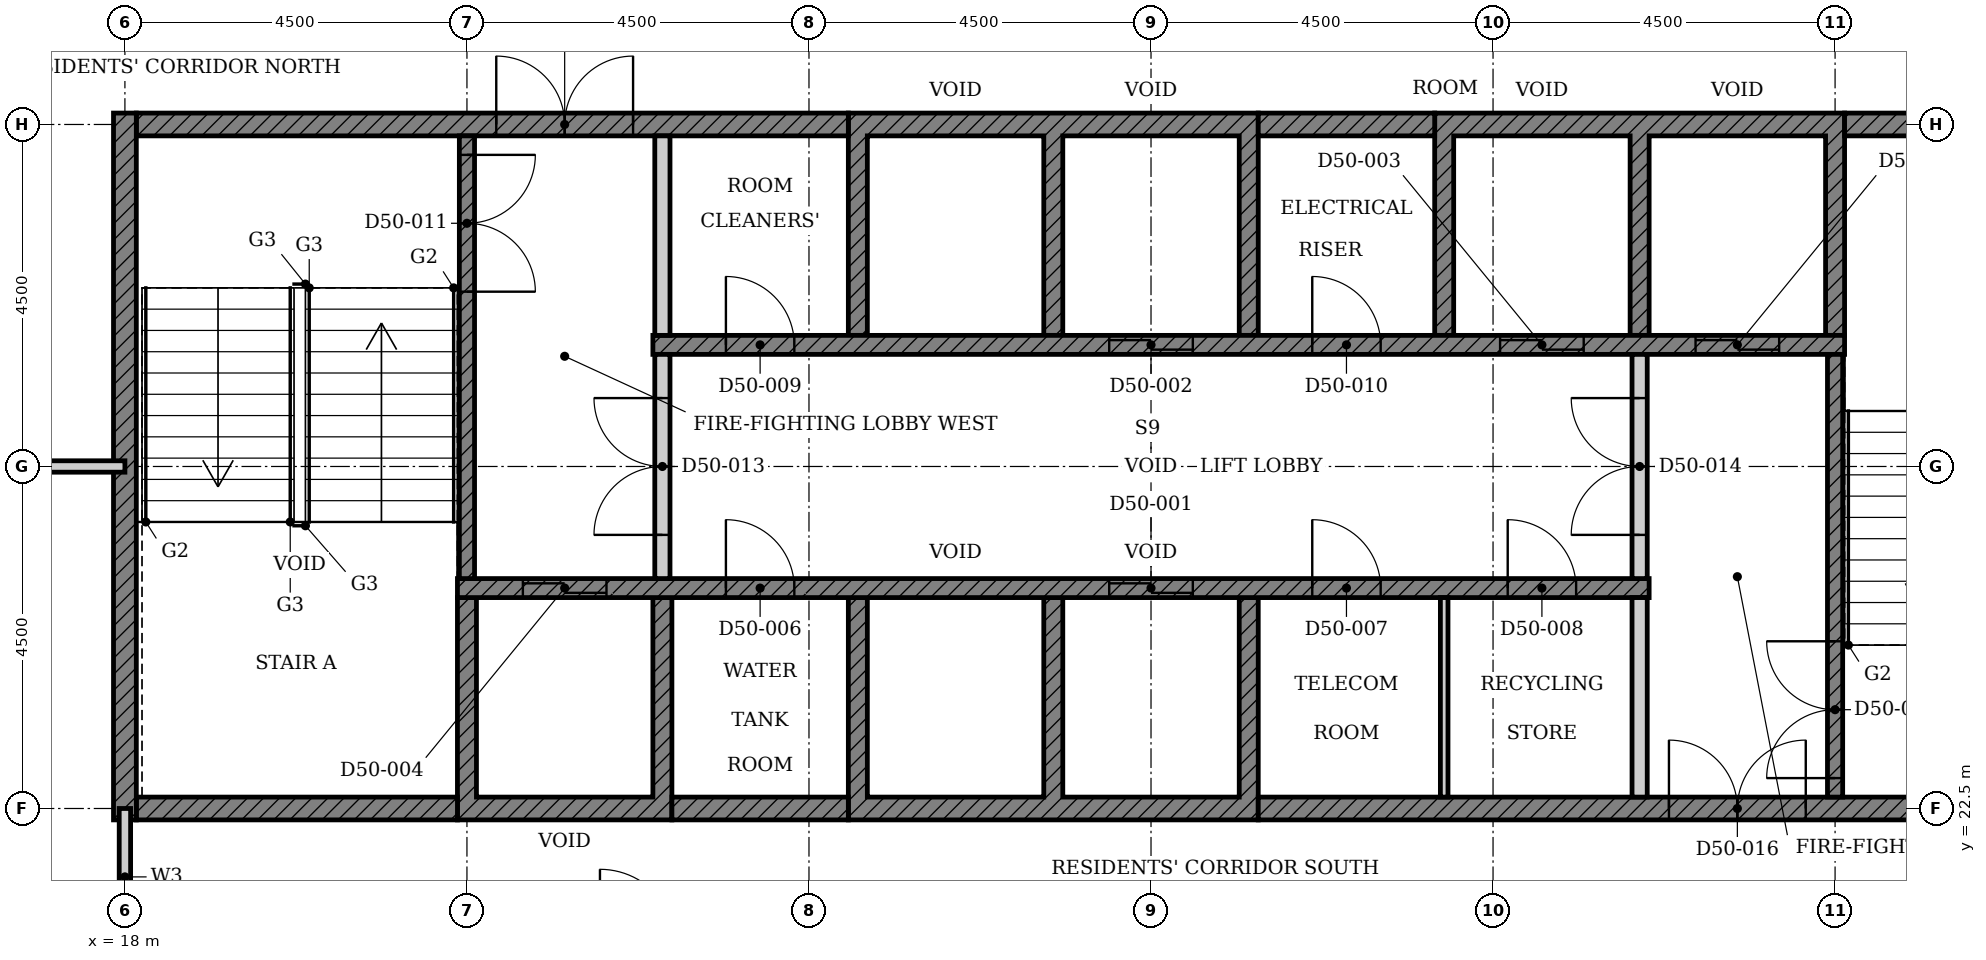
"""IFC4 building model, lengths in metres.
Left out: names, types, materials, properties, quantities, classifications, styles, units other than length and angle.
Written with IfcOpenShell. Run it as: python <this file> out.ifc"""

import sys

from ifc_helpers import new_model, si_unit, direction, frame, frame_2d, origin, place, context, subcontext, project, spatial, polyline, rectangle, outline, extrude, element, fill, save


model = new_model("IFC4")
c1 = context("Model", 3, precision=1e-05, world=origin(), true_north=direction((0.0, 1.0)))
c2 = subcontext(c1, "Body", "Model", "MODEL_VIEW")
j1 = project(units=[si_unit("LENGTHUNIT", "METRE"), si_unit("PLANEANGLEUNIT", "RADIAN")], contexts=[c1])
p1 = place(None, origin())
s1 = spatial("IfcSite", under=j1, at=p1, CompositionType="ELEMENT")
p2 = place(p1, origin())
s2 = spatial("IfcBuilding", under=s1, at=p2, CompositionType="ELEMENT")
p3 = place(p2, frame((0.0, 0.0, 199.8)))
s3 = spatial("IfcBuildingStorey", under=s2, at=p3, CompositionType="ELEMENT", Elevation=199.8)
p4 = place(p3, origin())
e1 = element("IfcWall", 1, at=p4, inside=s3, PredefinedType="SHEAR", context=c2, shape_type="SweptSolid", body=[
    extrude(outline(polyline([(22.375, 22.35), (25.197, 22.35), (25.197, 25.275), (24.947, 25.275), (24.947, 22.65), (22.625, 22.65), (22.625, 25.275), (22.375, 25.275), (22.375, 22.35)])), origin(), (0.0, 0.0, 1.0), 3.4),
])
p5 = place(p3, origin())
e2 = element("IfcWall", 2, at=p5, inside=s3, PredefinedType="SHEAR", context=c2, shape_type="SweptSolid", body=[
    extrude(outline(polyline([(27.518, 22.35), (32.911, 22.35), (32.911, 25.275), (32.661, 25.275), (32.661, 22.65), (30.339, 22.65), (30.339, 25.275), (30.089, 25.275), (30.089, 22.65), (27.768, 22.65), (27.768, 25.275), (27.518, 25.275), (27.518, 22.35)])), origin(), (0.0, 0.0, 1.0), 3.4),
])
p6 = place(p3, origin())
e3 = element("IfcWall", 3, at=p6, inside=s3, PredefinedType="SHEAR", context=c2, shape_type="SweptSolid", body=[
    extrude(outline(polyline([(27.518, 28.725), (27.768, 28.725), (27.768, 31.35), (30.089, 31.35), (30.089, 28.725), (30.339, 28.725), (30.339, 31.35), (32.661, 31.35), (32.661, 28.725), (32.911, 28.725), (32.911, 31.65), (27.518, 31.65), (27.518, 28.725)])), origin(), (0.0, 0.0, 1.0), 3.4),
])
p7 = place(p3, origin())
e4 = element("IfcWall", 4, at=p7, inside=s3, PredefinedType="SHEAR", context=c2, shape_type="SweptSolid", body=[
    extrude(outline(polyline([(35.232, 28.725), (35.482, 28.725), (35.482, 31.35), (37.803, 31.35), (37.803, 28.725), (38.053, 28.725), (38.053, 31.35), (40.375, 31.35), (40.375, 28.725), (40.625, 28.725), (40.625, 31.65), (35.232, 31.65), (35.232, 28.725)])), origin(), (0.0, 0.0, 1.0), 3.4),
])
p8 = place(p3, frame((18.15, 22.5, 0.0), z_axis=(0.0, 0.0, 1.0), x_axis=(1.0, 0.0, 0.0)))
e5 = element("IfcWall", 5, at=p8, inside=s3, PredefinedType="SHEAR", context=c2, shape_type="SweptSolid", body=[
    extrude(rectangle(XDim=4.225, YDim=0.3, at=frame_2d((2.113, 0.0))), origin(), (0.0, 0.0, 1.0), 3.4),
])
p9 = place(p3, frame((25.197, 22.5, 0.0), z_axis=(0.0, 0.0, 1.0), x_axis=(1.0, 0.0, 0.0)))
e6 = element("IfcWall", 6, at=p9, inside=s3, PredefinedType="SHEAR", context=c2, shape_type="SweptSolid", body=[
    extrude(rectangle(XDim=2.321, YDim=0.3, at=frame_2d((1.161, 0.0))), origin(), (0.0, 0.0, 1.0), 3.4),
])
p10 = place(p3, frame((32.911, 22.5, 0.0), z_axis=(0.0, 0.0, 1.0), x_axis=(1.0, 0.0, 0.0)))
e7 = element("IfcWall", 7, at=p10, inside=s3, PredefinedType="SHEAR", context=c2, shape_type="SweptSolid", body=[
    extrude(rectangle(XDim=11.939, YDim=0.3, at=frame_2d((5.97, 0.0))), origin(), (0.0, 0.0, 1.0), 3.4),
])
p11 = place(p10, frame((5.404, 0.0, 0.0)))
e8 = element("IfcOpeningElement", 8, at=p11, cuts=e7, PredefinedType="OPENING", context=c2, shape_type="SweptSolid", body=[
    extrude(rectangle(XDim=1.8, YDim=2.1, at=frame_2d((0.9, 1.05))), frame((0.0, 0.16, 0.0), z_axis=(0.0, -1.0, 0.0), x_axis=(1.0, 0.0, 0.0)), (0.0, 0.0, 1.0), 0.32),
])
p12 = place(p3, frame((18.15, 31.5, 0.0), z_axis=(0.0, 0.0, 1.0), x_axis=(1.0, 0.0, 0.0)))
e9 = element("IfcWall", 9, at=p12, inside=s3, PredefinedType="SHEAR", context=c2, shape_type="SweptSolid", body=[
    extrude(rectangle(XDim=9.368, YDim=0.3, at=frame_2d((4.684, 0.0))), origin(), (0.0, 0.0, 1.0), 3.4),
])
p13 = place(p12, frame((4.736, 0.0, 0.0)))
e10 = element("IfcOpeningElement", 10, at=p13, cuts=e9, PredefinedType="OPENING", context=c2, shape_type="SweptSolid", body=[
    extrude(rectangle(XDim=1.8, YDim=2.1, at=frame_2d((0.9, 1.05))), frame((0.0, 0.16, 0.0), z_axis=(0.0, -1.0, 0.0), x_axis=(1.0, 0.0, 0.0)), (0.0, 0.0, 1.0), 0.32),
])
p14 = place(p3, frame((32.911, 31.5, 0.0), z_axis=(0.0, 0.0, 1.0), x_axis=(1.0, 0.0, 0.0)))
e11 = element("IfcWall", 11, at=p14, inside=s3, PredefinedType="SHEAR", context=c2, shape_type="SweptSolid", body=[
    extrude(rectangle(XDim=2.322, YDim=0.3, at=frame_2d((1.161, 0.0))), origin(), (0.0, 0.0, 1.0), 3.4),
])
p15 = place(p3, frame((40.625, 31.5, 0.0), z_axis=(0.0, 0.0, 1.0), x_axis=(1.0, 0.0, 0.0)))
e12 = element("IfcWall", 12, at=p15, inside=s3, PredefinedType="SHEAR", context=c2, shape_type="SweptSolid", body=[
    extrude(rectangle(XDim=4.225, YDim=0.3, at=frame_2d((2.113, 0.0))), origin(), (0.0, 0.0, 1.0), 3.4),
])
p16 = place(p3, frame((18.0, 22.35, 0.0), z_axis=(0.0, 0.0, 1.0), x_axis=(0.0, 1.0, 0.0)))
e13 = element("IfcWall", 13, at=p16, inside=s3, PredefinedType="SHEAR", context=c2, shape_type="SweptSolid", body=[
    extrude(rectangle(XDim=9.3, YDim=0.3, at=frame_2d((4.65, 0.0))), origin(), (0.0, 0.0, 1.0), 3.4),
])
p17 = place(p3, frame((22.375, 25.4, 0.0), z_axis=(0.0, 0.0, 1.0), x_axis=(1.0, 0.0, 0.0)))
e14 = element("IfcWall", 14, at=p17, inside=s3, PredefinedType="SHEAR", context=c2, shape_type="SweptSolid", body=[
    extrude(rectangle(XDim=15.678, YDim=0.25, at=frame_2d((7.839, 0.0))), origin(), (0.0, 0.0, 1.0), 3.4),
])
p18 = place(p17, frame((8.575, 0.0, 0.0)))
e15 = element("IfcOpeningElement", 15, at=p18, cuts=e14, PredefinedType="OPENING", context=c2, shape_type="SweptSolid", body=[
    extrude(rectangle(XDim=1.1, YDim=2.1, at=frame_2d((0.55, 1.05))), frame((0.0, 0.135, 0.0), z_axis=(0.0, -1.0, 0.0), x_axis=(1.0, 0.0, 0.0)), (0.0, 0.0, 1.0), 0.27),
])
p19 = place(p17, frame((0.861, 0.0, 0.0)))
e16 = element("IfcOpeningElement", 16, at=p19, cuts=e14, PredefinedType="OPENING", context=c2, shape_type="SweptSolid", body=[
    extrude(rectangle(XDim=1.1, YDim=2.1, at=frame_2d((0.55, 1.05))), frame((0.0, 0.135, 0.0), z_axis=(0.0, -1.0, 0.0), x_axis=(1.0, 0.0, 0.0)), (0.0, 0.0, 1.0), 0.27),
])
p20 = place(p17, frame((3.532, 0.0, 0.0)))
e17 = element("IfcOpeningElement", 17, at=p20, cuts=e14, PredefinedType="OPENING", context=c2, shape_type="SweptSolid", body=[
    extrude(rectangle(XDim=0.9, YDim=2.1, at=frame_2d((0.45, 1.05))), frame((0.0, 0.135, 0.0), z_axis=(0.0, -1.0, 0.0), x_axis=(1.0, 0.0, 0.0)), (0.0, 0.0, 1.0), 0.27),
])
p21 = place(p17, frame((11.246, 0.0, 0.0)))
e18 = element("IfcOpeningElement", 18, at=p21, cuts=e14, PredefinedType="OPENING", context=c2, shape_type="SweptSolid", body=[
    extrude(rectangle(XDim=0.9, YDim=2.1, at=frame_2d((0.45, 1.05))), frame((0.0, 0.135, 0.0), z_axis=(0.0, -1.0, 0.0), x_axis=(1.0, 0.0, 0.0)), (0.0, 0.0, 1.0), 0.27),
])
p22 = place(p17, frame((13.818, 0.0, 0.0)))
e19 = element("IfcOpeningElement", 19, at=p22, cuts=e14, PredefinedType="OPENING", context=c2, shape_type="SweptSolid", body=[
    extrude(rectangle(XDim=0.9, YDim=2.1, at=frame_2d((0.45, 1.05))), frame((0.0, 0.135, 0.0), z_axis=(0.0, -1.0, 0.0), x_axis=(1.0, 0.0, 0.0)), (0.0, 0.0, 1.0), 0.27),
])
p23 = place(p3, frame((24.947, 28.6, 0.0), z_axis=(0.0, 0.0, 1.0), x_axis=(1.0, 0.0, 0.0)))
e20 = element("IfcWall", 20, at=p23, inside=s3, PredefinedType="SHEAR", context=c2, shape_type="SweptSolid", body=[
    extrude(rectangle(XDim=15.678, YDim=0.25, at=frame_2d((7.839, 0.0))), origin(), (0.0, 0.0, 1.0), 3.4),
])
p24 = place(p23, frame((6.004, 0.0, 0.0)))
e21 = element("IfcOpeningElement", 21, at=p24, cuts=e20, PredefinedType="OPENING", context=c2, shape_type="SweptSolid", body=[
    extrude(rectangle(XDim=1.1, YDim=2.1, at=frame_2d((0.55, 1.05))), frame((0.0, 0.135, 0.0), z_axis=(0.0, -1.0, 0.0), x_axis=(1.0, 0.0, 0.0)), (0.0, 0.0, 1.0), 0.27),
])
p25 = place(p23, frame((11.146, 0.0, 0.0)))
e22 = element("IfcOpeningElement", 22, at=p25, cuts=e20, PredefinedType="OPENING", context=c2, shape_type="SweptSolid", body=[
    extrude(rectangle(XDim=1.1, YDim=2.1, at=frame_2d((0.55, 1.05))), frame((0.0, 0.135, 0.0), z_axis=(0.0, -1.0, 0.0), x_axis=(1.0, 0.0, 0.0)), (0.0, 0.0, 1.0), 0.27),
])
p26 = place(p23, frame((13.718, 0.0, 0.0)))
e23 = element("IfcOpeningElement", 23, at=p26, cuts=e20, PredefinedType="OPENING", context=c2, shape_type="SweptSolid", body=[
    extrude(rectangle(XDim=1.1, YDim=2.1, at=frame_2d((0.55, 1.05))), frame((0.0, 0.135, 0.0), z_axis=(0.0, -1.0, 0.0), x_axis=(1.0, 0.0, 0.0)), (0.0, 0.0, 1.0), 0.27),
])
p27 = place(p23, frame((0.961, 0.0, 0.0)))
e24 = element("IfcOpeningElement", 24, at=p27, cuts=e20, PredefinedType="OPENING", context=c2, shape_type="SweptSolid", body=[
    extrude(rectangle(XDim=0.9, YDim=2.1, at=frame_2d((0.45, 1.05))), frame((0.0, 0.135, 0.0), z_axis=(0.0, -1.0, 0.0), x_axis=(1.0, 0.0, 0.0)), (0.0, 0.0, 1.0), 0.27),
])
p28 = place(p23, frame((8.675, 0.0, 0.0)))
e25 = element("IfcOpeningElement", 25, at=p28, cuts=e20, PredefinedType="OPENING", context=c2, shape_type="SweptSolid", body=[
    extrude(rectangle(XDim=0.9, YDim=2.1, at=frame_2d((0.45, 1.05))), frame((0.0, 0.135, 0.0), z_axis=(0.0, -1.0, 0.0), x_axis=(1.0, 0.0, 0.0)), (0.0, 0.0, 1.0), 0.27),
])
p29 = place(p3, frame((37.928, 22.65, 0.0), z_axis=(0.0, 0.0, 1.0), x_axis=(0.0, 1.0, 0.0)))
e26 = element("IfcWall", 26, at=p29, inside=s3, PredefinedType="PARTITIONING", context=c2, shape_type="SweptSolid", body=[
    extrude(rectangle(XDim=2.625, YDim=0.2, at=frame_2d((1.312, 0.0))), origin(), (0.0, 0.0, 1.0), 3.4),
])
p30 = place(p3, frame((35.357, 22.65, 0.0), z_axis=(0.0, 0.0, 1.0), x_axis=(0.0, 1.0, 0.0)))
e27 = element("IfcWall", 27, at=p30, inside=s3, PredefinedType="PARTITIONING", context=c2, shape_type="SweptSolid", body=[
    extrude(rectangle(XDim=2.625, YDim=0.1, at=frame_2d((1.312, 0.0))), origin(), (0.0, 0.0, 1.0), 3.4),
])
p31 = place(p3, frame((25.072, 28.725, 0.0), z_axis=(0.0, 0.0, 1.0), x_axis=(0.0, 1.0, 0.0)))
e28 = element("IfcWall", 28, at=p31, inside=s3, PredefinedType="PARTITIONING", context=c2, shape_type="SweptSolid", body=[
    extrude(rectangle(XDim=2.625, YDim=0.2, at=frame_2d((1.312, 0.0))), origin(), (0.0, 0.0, 1.0), 3.4),
])
p32 = place(p3, frame((22.5, 31.35, 0.0), z_axis=(0.0, 0.0, 1.0), x_axis=(0.0, -1.0, 0.0)))
e29 = element("IfcWall", 29, at=p32, inside=s3, PredefinedType="SHEAR", context=c2, shape_type="SweptSolid", body=[
    extrude(rectangle(XDim=5.825, YDim=0.2, at=frame_2d((2.913, 0.0))), origin(), (0.0, 0.0, 1.0), 3.4),
])
p33 = place(p32, frame((0.25, 0.0, 0.0)))
e30 = element("IfcOpeningElement", 30, at=p33, cuts=e29, PredefinedType="OPENING", context=c2, shape_type="SweptSolid", body=[
    extrude(rectangle(XDim=1.8, YDim=2.1, at=frame_2d((0.9, 1.05))), frame((0.0, 0.11, 0.0), z_axis=(0.0, -1.0, 0.0), x_axis=(1.0, 0.0, 0.0)), (0.0, 0.0, 1.0), 0.22),
])
p34 = place(p3, frame((40.5, 22.65, 0.0), z_axis=(0.0, 0.0, 1.0), x_axis=(0.0, 1.0, 0.0)))
e31 = element("IfcWall", 31, at=p34, inside=s3, PredefinedType="SHEAR", context=c2, shape_type="SweptSolid", body=[
    extrude(rectangle(XDim=5.825, YDim=0.2, at=frame_2d((2.913, 0.0))), origin(), (0.0, 0.0, 1.0), 3.4),
])
p35 = place(p34, frame((0.25, 0.0, 0.0)))
e32 = element("IfcOpeningElement", 32, at=p35, cuts=e31, PredefinedType="OPENING", context=c2, shape_type="SweptSolid", body=[
    extrude(rectangle(XDim=1.8, YDim=2.1, at=frame_2d((0.9, 1.05))), frame((0.0, 0.11, 0.0), z_axis=(0.0, -1.0, 0.0), x_axis=(1.0, 0.0, 0.0)), (0.0, 0.0, 1.0), 0.22),
])
p36 = place(p3, frame((25.072, 25.525, 0.0), z_axis=(0.0, 0.0, 1.0), x_axis=(0.0, 1.0, 0.0)))
e33 = element("IfcWall", 33, at=p36, inside=s3, PredefinedType="PARTITIONING", context=c2, shape_type="SweptSolid", body=[
    extrude(rectangle(XDim=2.95, YDim=0.2, at=frame_2d((1.475, 0.0))), origin(), (0.0, 0.0, 1.0), 3.4),
])
p37 = place(p36, frame((0.575, 0.0, 0.0)))
e34 = element("IfcOpeningElement", 34, at=p37, cuts=e33, PredefinedType="OPENING", context=c2, shape_type="SweptSolid", body=[
    extrude(rectangle(XDim=1.8, YDim=2.1, at=frame_2d((0.9, 1.05))), frame((0.0, 0.11, 0.0), z_axis=(0.0, -1.0, 0.0), x_axis=(1.0, 0.0, 0.0)), (0.0, 0.0, 1.0), 0.22),
])
p38 = place(p3, frame((37.928, 25.525, 0.0), z_axis=(0.0, 0.0, 1.0), x_axis=(0.0, 1.0, 0.0)))
e35 = element("IfcWall", 35, at=p38, inside=s3, PredefinedType="PARTITIONING", context=c2, shape_type="SweptSolid", body=[
    extrude(rectangle(XDim=2.95, YDim=0.2, at=frame_2d((1.475, 0.0))), origin(), (0.0, 0.0, 1.0), 3.4),
])
p39 = place(p38, frame((0.575, 0.0, 0.0)))
e36 = element("IfcOpeningElement", 36, at=p39, cuts=e35, PredefinedType="OPENING", context=c2, shape_type="SweptSolid", body=[
    extrude(rectangle(XDim=1.8, YDim=2.1, at=frame_2d((0.9, 1.05))), frame((0.0, 0.11, 0.0), z_axis=(0.0, -1.0, 0.0), x_axis=(1.0, 0.0, 0.0)), (0.0, 0.0, 1.0), 0.22),
])
p40 = place(p3, frame((4.5, 27.0, 0.0), z_axis=(0.0, 0.0, 1.0), x_axis=(1.0, 0.0, 0.0)))
e37 = element("IfcWall", 37, at=p40, inside=s3, PredefinedType="PARTITIONING", context=c2, shape_type="SweptSolid", body=[
    extrude(rectangle(XDim=13.5, YDim=0.15, at=frame_2d((6.75, 0.0))), origin(), (0.0, 0.0, 1.0), 2.68),
])
p41 = place(p40, frame((5.35, 0.0, 0.0)))
e38 = element("IfcOpeningElement", 38, at=p41, cuts=e37, PredefinedType="OPENING", context=c2, shape_type="SweptSolid", body=[
    extrude(rectangle(XDim=1.0, YDim=2.1, at=frame_2d((0.5, 1.05))), frame((0.0, 0.085, 0.0), z_axis=(0.0, -1.0, 0.0), x_axis=(1.0, 0.0, 0.0)), (0.0, 0.0, 1.0), 0.17),
])
p42 = place(p3, frame((18.0, 20.7, 0.0), z_axis=(0.0, 0.0, 1.0), x_axis=(0.0, 1.0, 0.0)))
e39 = element("IfcWall", 39, at=p42, inside=s3, PredefinedType="PARTITIONING", context=c2, shape_type="SweptSolid", body=[
    extrude(rectangle(XDim=1.8, YDim=0.15, at=frame_2d((0.9, 0.0))), origin(), (0.0, 0.0, 1.0), 3.4),
])
p43 = place(p18, origin())
e40 = element("IfcDoor", 40, at=p43, inside=s3, OperationType="DOUBLE_DOOR_SLIDING", PredefinedType="DOOR", context=c2, shape_type="SweptSolid", body=[
    extrude(rectangle(XDim=1.1, YDim=2.1, at=frame_2d((0.55, 1.05))), frame((0.0, 0.025, 0.0), z_axis=(0.0, -1.0, 0.0), x_axis=(1.0, 0.0, 0.0)), (0.0, 0.0, 1.0), 0.05),
])
fill(e15, e40)
p44 = place(p24, origin())
e41 = element("IfcDoor", 41, at=p44, inside=s3, OperationType="DOUBLE_DOOR_SLIDING", PredefinedType="DOOR", context=c2, shape_type="SweptSolid", body=[
    extrude(rectangle(XDim=1.1, YDim=2.1, at=frame_2d((0.55, 1.05))), frame((0.0, 0.025, 0.0), z_axis=(0.0, -1.0, 0.0), x_axis=(1.0, 0.0, 0.0)), (0.0, 0.0, 1.0), 0.05),
])
fill(e21, e41)
p45 = place(p25, origin())
e42 = element("IfcDoor", 42, at=p45, inside=s3, OperationType="DOUBLE_DOOR_SLIDING", PredefinedType="DOOR", context=c2, shape_type="SweptSolid", body=[
    extrude(rectangle(XDim=1.1, YDim=2.1, at=frame_2d((0.55, 1.05))), frame((0.0, 0.025, 0.0), z_axis=(0.0, -1.0, 0.0), x_axis=(1.0, 0.0, 0.0)), (0.0, 0.0, 1.0), 0.05),
])
fill(e22, e42)
p46 = place(p19, origin())
e43 = element("IfcDoor", 43, at=p46, inside=s3, OperationType="DOUBLE_DOOR_SLIDING", PredefinedType="DOOR", context=c2, shape_type="SweptSolid", body=[
    extrude(rectangle(XDim=1.1, YDim=2.1, at=frame_2d((0.55, 1.05))), frame((0.0, 0.025, 0.0), z_axis=(0.0, -1.0, 0.0), x_axis=(1.0, 0.0, 0.0)), (0.0, 0.0, 1.0), 0.05),
])
fill(e16, e43)
p47 = place(p26, origin())
e44 = element("IfcDoor", 44, at=p47, inside=s3, OperationType="DOUBLE_DOOR_SLIDING", PredefinedType="DOOR", context=c2, shape_type="SweptSolid", body=[
    extrude(rectangle(XDim=1.1, YDim=2.1, at=frame_2d((0.55, 1.05))), frame((0.0, 0.025, 0.0), z_axis=(0.0, -1.0, 0.0), x_axis=(1.0, 0.0, 0.0)), (0.0, 0.0, 1.0), 0.05),
])
fill(e23, e44)
p48 = place(p20, origin())
e45 = element("IfcDoor", 45, at=p48, inside=s3, OperationType="SINGLE_SWING_LEFT", PredefinedType="DOOR", context=c2, shape_type="SweptSolid", body=[
    extrude(rectangle(XDim=0.9, YDim=2.1, at=frame_2d((0.45, 1.05))), frame((0.0, 0.025, 0.0), z_axis=(0.0, -1.0, 0.0), x_axis=(1.0, 0.0, 0.0)), (0.0, 0.0, 1.0), 0.05),
])
fill(e17, e45)
p49 = place(p21, origin())
e46 = element("IfcDoor", 46, at=p49, inside=s3, OperationType="SINGLE_SWING_LEFT", PredefinedType="DOOR", context=c2, shape_type="SweptSolid", body=[
    extrude(rectangle(XDim=0.9, YDim=2.1, at=frame_2d((0.45, 1.05))), frame((0.0, 0.025, 0.0), z_axis=(0.0, -1.0, 0.0), x_axis=(1.0, 0.0, 0.0)), (0.0, 0.0, 1.0), 0.05),
])
fill(e18, e46)
p50 = place(p22, origin())
e47 = element("IfcDoor", 47, at=p50, inside=s3, OperationType="SINGLE_SWING_LEFT", PredefinedType="DOOR", context=c2, shape_type="SweptSolid", body=[
    extrude(rectangle(XDim=0.9, YDim=2.1, at=frame_2d((0.45, 1.05))), frame((0.0, 0.025, 0.0), z_axis=(0.0, -1.0, 0.0), x_axis=(1.0, 0.0, 0.0)), (0.0, 0.0, 1.0), 0.05),
])
fill(e19, e47)
p51 = place(p27, origin())
e48 = element("IfcDoor", 48, at=p51, inside=s3, OperationType="SINGLE_SWING_LEFT", PredefinedType="DOOR", context=c2, shape_type="SweptSolid", body=[
    extrude(rectangle(XDim=0.9, YDim=2.1, at=frame_2d((0.45, 1.05))), frame((0.0, 0.025, 0.0), z_axis=(0.0, -1.0, 0.0), x_axis=(1.0, 0.0, 0.0)), (0.0, 0.0, 1.0), 0.05),
])
fill(e24, e48)
p52 = place(p28, origin())
e49 = element("IfcDoor", 49, at=p52, inside=s3, OperationType="SINGLE_SWING_LEFT", PredefinedType="DOOR", context=c2, shape_type="SweptSolid", body=[
    extrude(rectangle(XDim=0.9, YDim=2.1, at=frame_2d((0.45, 1.05))), frame((0.0, 0.025, 0.0), z_axis=(0.0, -1.0, 0.0), x_axis=(1.0, 0.0, 0.0)), (0.0, 0.0, 1.0), 0.05),
])
fill(e25, e49)
p53 = place(p33, origin())
e50 = element("IfcDoor", 50, at=p53, inside=s3, OperationType="DOUBLE_DOOR_SINGLE_SWING", PredefinedType="DOOR", context=c2, shape_type="SweptSolid", body=[
    extrude(rectangle(XDim=1.8, YDim=2.1, at=frame_2d((0.9, 1.05))), frame((0.0, 0.025, 0.0), z_axis=(0.0, -1.0, 0.0), x_axis=(1.0, 0.0, 0.0)), (0.0, 0.0, 1.0), 0.05),
])
fill(e30, e50)
p54 = place(p35, origin())
e51 = element("IfcDoor", 51, at=p54, inside=s3, OperationType="DOUBLE_DOOR_SINGLE_SWING", PredefinedType="DOOR", context=c2, shape_type="SweptSolid", body=[
    extrude(rectangle(XDim=1.8, YDim=2.1, at=frame_2d((0.9, 1.05))), frame((0.0, 0.025, 0.0), z_axis=(0.0, -1.0, 0.0), x_axis=(1.0, 0.0, 0.0)), (0.0, 0.0, 1.0), 0.05),
])
fill(e32, e51)
p55 = place(p37, origin())
e52 = element("IfcDoor", 52, at=p55, inside=s3, OperationType="DOUBLE_DOOR_SINGLE_SWING", PredefinedType="DOOR", context=c2, shape_type="SweptSolid", body=[
    extrude(rectangle(XDim=1.8, YDim=2.1, at=frame_2d((0.9, 1.05))), frame((0.0, 0.025, 0.0), z_axis=(0.0, -1.0, 0.0), x_axis=(1.0, 0.0, 0.0)), (0.0, 0.0, 1.0), 0.05),
])
fill(e34, e52)
p56 = place(p39, origin())
e53 = element("IfcDoor", 53, at=p56, inside=s3, OperationType="DOUBLE_DOOR_SINGLE_SWING", PredefinedType="DOOR", context=c2, shape_type="SweptSolid", body=[
    extrude(rectangle(XDim=1.8, YDim=2.1, at=frame_2d((0.9, 1.05))), frame((0.0, 0.025, 0.0), z_axis=(0.0, -1.0, 0.0), x_axis=(1.0, 0.0, 0.0)), (0.0, 0.0, 1.0), 0.05),
])
fill(e36, e53)
p57 = place(p13, origin())
e54 = element("IfcDoor", 54, at=p57, inside=s3, OperationType="DOUBLE_DOOR_SINGLE_SWING", PredefinedType="DOOR", context=c2, shape_type="SweptSolid", body=[
    extrude(rectangle(XDim=1.8, YDim=2.1, at=frame_2d((0.9, 1.05))), frame((0.0, 0.025, 0.0), z_axis=(0.0, -1.0, 0.0), x_axis=(1.0, 0.0, 0.0)), (0.0, 0.0, 1.0), 0.05),
])
fill(e10, e54)
p58 = place(p11, origin())
e55 = element("IfcDoor", 55, at=p58, inside=s3, OperationType="DOUBLE_DOOR_SINGLE_SWING", PredefinedType="DOOR", context=c2, shape_type="SweptSolid", body=[
    extrude(rectangle(XDim=1.8, YDim=2.1, at=frame_2d((0.9, 1.05))), frame((0.0, 0.025, 0.0), z_axis=(0.0, -1.0, 0.0), x_axis=(1.0, 0.0, 0.0)), (0.0, 0.0, 1.0), 0.05),
])
fill(e8, e55)
save(model, sys.argv[1])
